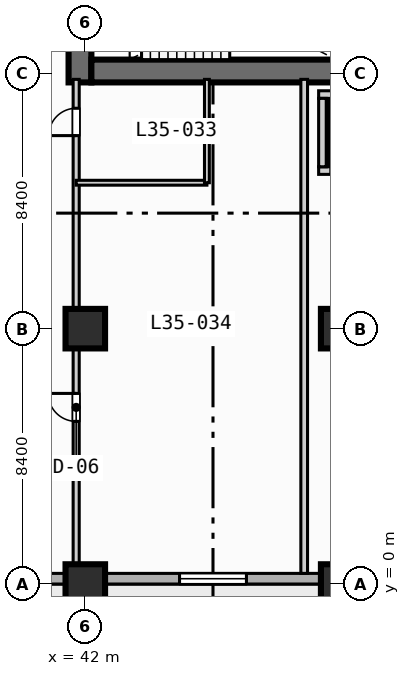
"""IFC4 building model, lengths in metres.
Left out: names, types, materials, properties, quantities, classifications, styles, units other than length and angle.
Written with IfcOpenShell. Run it as: python <this file> out.ifc"""

import sys

from ifc_helpers import new_model, si_unit, direction, frame, frame_2d, origin, origin_2d, place, context, subcontext, project, spatial, rectangle, extrude, element, fill, save


model = new_model("IFC4")
c1 = context("Model", 3, precision=1e-05, world=origin(), true_north=direction((0.0, 1.0)))
c2 = subcontext(c1, "Body", "Model", "MODEL_VIEW")
j1 = project(units=[si_unit("LENGTHUNIT", "METRE"), si_unit("PLANEANGLEUNIT", "RADIAN")], contexts=[c1])
p1 = place(None, origin())
s1 = spatial("IfcSite", under=j1, at=p1, CompositionType="ELEMENT")
p2 = place(p1, origin())
s2 = spatial("IfcBuilding", under=s1, at=p2, CompositionType="ELEMENT")
p3 = place(p2, frame((0.0, 0.0, 145.6)))
s3 = spatial("IfcBuildingStorey", under=s2, at=p3, CompositionType="ELEMENT", Elevation=145.6)
p4 = place(p3, frame((41.825, 16.5, 0.0), z_axis=(0.0, 0.0, 1.0), x_axis=(0.0, 1.0, 0.0)))
e1 = element("IfcWall", 1, at=p4, inside=s3, PredefinedType="SHEAR", context=c2, shape_type="SweptSolid", body=[
    extrude(rectangle(XDim=1.5, YDim=0.75, at=frame_2d((0.75, 0.0))), origin(), (0.0, 0.0, 1.0), 3.55),
])
p5 = place(p3, frame((42.2, 16.875, 0.0), z_axis=(0.0, 0.0, 1.0), x_axis=(1.0, 0.0, 0.0)))
e2 = element("IfcWall", 2, at=p5, inside=s3, PredefinedType="SHEAR", context=c2, shape_type="SweptSolid", body=[
    extrude(rectangle(XDim=16.35, YDim=0.75, at=frame_2d((8.175, 0.0))), origin(), (0.0, 0.0, 1.0), 3.55),
])
for number, where, z_axis, x_axis in (
    (3, (42.0, 0.0, 0.0), (0.0, 0.0, 1.0), (1.0, 0.0, 0.0)),
    (4, (42.0, 8.4, 0.0), (0.0, 0.0, 1.0), (1.0, 0.0, 0.0)),
    (5, (50.4, 0.0, 0.0), (0.0, 0.0, 1.0), (1.0, 0.0, 0.0)),
    (6, (50.4, 8.4, 0.0), (0.0, 0.0, 1.0), (1.0, 0.0, 0.0)),
):
    element("IfcColumn", number, at=place(p3, frame(where, z_axis=z_axis, x_axis=x_axis)), inside=s3, PredefinedType="COLUMN", context=c2, shape_type="SweptSolid", body=[
        extrude(rectangle(XDim=1.3, YDim=1.3, at=origin_2d()), origin(), (0.0, 0.0, 1.0), 3.8),
    ])
p6 = place(p3, frame((72.425, 0.175, 0.0), z_axis=(0.0, 0.0, 1.0), x_axis=(-1.0, 0.0, 0.0)))
e7 = element("IfcWall", 7, at=p6, inside=s3, PredefinedType="STANDARD", context=c2, shape_type="SweptSolid", body=[
    extrude(rectangle(XDim=69.25, YDim=0.35, at=frame_2d((34.625, 0.0))), origin(), (0.0, 0.0, 1.0), 3.55),
])
p7 = place(p6, frame((50.725, 0.0, 0.0)))
e8 = element("IfcOpeningElement", 8, at=p7, cuts=e7, PredefinedType="OPENING", context=c2, shape_type="SweptSolid", body=[
    extrude(rectangle(XDim=1.4, YDim=2.2, at=frame_2d((0.7, 1.1))), frame((0.0, 0.185, 0.0), z_axis=(0.0, -1.0, 0.0), x_axis=(1.0, 0.0, 0.0)), (0.0, 0.0, 1.0), 0.37),
])
p8 = place(p6, frame((58.725, 0.0, 0.85)))
e9 = element("IfcOpeningElement", 9, at=p8, cuts=e7, PredefinedType="OPENING", context=c2, shape_type="SweptSolid", body=[
    extrude(rectangle(XDim=2.2, YDim=1.8, at=frame_2d((1.1, 0.9))), frame((0.0, 0.185, 0.0), z_axis=(0.0, -1.0, 0.0), x_axis=(1.0, 0.0, 0.0)), (0.0, 0.0, 1.0), 0.37),
])
p9 = place(p6, frame((33.525, 0.0, 0.85)))
e10 = element("IfcOpeningElement", 10, at=p9, cuts=e7, PredefinedType="OPENING", context=c2, shape_type="SweptSolid", body=[
    extrude(rectangle(XDim=2.2, YDim=1.8, at=frame_2d((1.1, 0.9))), frame((0.0, 0.185, 0.0), z_axis=(0.0, -1.0, 0.0), x_axis=(1.0, 0.0, 0.0)), (0.0, 0.0, 1.0), 0.37),
])
p10 = place(p6, frame((25.125, 0.0, 0.85)))
e11 = element("IfcOpeningElement", 11, at=p10, cuts=e7, PredefinedType="OPENING", context=c2, shape_type="SweptSolid", body=[
    extrude(rectangle(XDim=2.2, YDim=1.8, at=frame_2d((1.1, 0.9))), frame((0.0, 0.185, 0.0), z_axis=(0.0, -1.0, 0.0), x_axis=(1.0, 0.0, 0.0)), (0.0, 0.0, 1.0), 0.37),
])
p11 = place(p6, frame((8.325, 0.0, 0.85)))
e12 = element("IfcOpeningElement", 12, at=p11, cuts=e7, PredefinedType="OPENING", context=c2, shape_type="SweptSolid", body=[
    extrude(rectangle(XDim=2.2, YDim=1.8, at=frame_2d((1.1, 0.9))), frame((0.0, 0.185, 0.0), z_axis=(0.0, -1.0, 0.0), x_axis=(1.0, 0.0, 0.0)), (0.0, 0.0, 1.0), 0.37),
])
p12 = place(p6, frame((2.125, 0.0, 0.85)))
e13 = element("IfcOpeningElement", 13, at=p12, cuts=e7, PredefinedType="OPENING", context=c2, shape_type="SweptSolid", body=[
    extrude(rectangle(XDim=1.8, YDim=1.8, at=frame_2d((0.9, 0.9))), frame((0.0, 0.185, 0.0), z_axis=(0.0, -1.0, 0.0), x_axis=(1.0, 0.0, 0.0)), (0.0, 0.0, 1.0), 0.37),
])
p13 = place(p3, frame((49.675, 13.6, 0.0), z_axis=(0.0, 0.0, 1.0), x_axis=(1.0, 0.0, 0.0)))
e14 = element("IfcWall", 14, at=p13, inside=s3, PredefinedType="SOLIDWALL", context=c2, shape_type="SweptSolid", body=[
    extrude(rectangle(XDim=2.25, YDim=0.25, at=frame_2d((1.125, 0.0))), origin(), (0.0, 0.0, 1.0), 3.55),
])
p14 = place(p13, frame((0.4, 0.0, 0.0)))
e15 = element("IfcOpeningElement", 15, at=p14, cuts=e14, PredefinedType="OPENING", context=c2, shape_type="SweptSolid", body=[
    extrude(rectangle(XDim=1.1, YDim=2.15, at=frame_2d((0.55, 1.075))), frame((0.0, 0.135, 0.0), z_axis=(0.0, -1.0, 0.0), x_axis=(1.0, 0.0, 0.0)), (0.0, 0.0, 1.0), 0.27),
])
for number, where, z_axis, x_axis in (
    (16, (49.675, 16.1, 0.0), (0.0, 0.0, 1.0), (1.0, 0.0, 0.0)),
    (17, (49.8, 13.725, 0.0), (0.0, 0.0, 1.0), (0.0, 1.0, 0.0)),
):
    element("IfcWall", number, at=place(p3, frame(where, z_axis=z_axis, x_axis=x_axis)), inside=s3, PredefinedType="SOLIDWALL", context=c2, shape_type="SweptSolid", body=[
        extrude(rectangle(XDim=2.25, YDim=0.25, at=frame_2d((1.125, 0.0))), origin(), (0.0, 0.0, 1.0), 3.55),
    ])
p15 = place(p3, frame((41.7, 0.35, 0.0), z_axis=(0.0, 0.0, 1.0), x_axis=(0.0, 1.0, 0.0)))
e18 = element("IfcWall", 18, at=p15, inside=s3, PredefinedType="PARTITIONING", context=c2, shape_type="SweptSolid", body=[
    extrude(rectangle(XDim=16.25, YDim=0.2, at=frame_2d((8.125, 0.0))), origin(), (0.0, 0.0, 1.0), 2.8),
])
p16 = place(p15, frame((5.0, 0.0, 0.0)))
e19 = element("IfcOpeningElement", 19, at=p16, cuts=e18, PredefinedType="OPENING", context=c2, shape_type="SweptSolid", body=[
    extrude(rectangle(XDim=0.92, YDim=2.1, at=frame_2d((0.46, 1.05))), frame((0.0, 0.11, 0.0), z_axis=(0.0, -1.0, 0.0), x_axis=(1.0, 0.0, 0.0)), (0.0, 0.0, 1.0), 0.22),
])
p17 = place(p15, frame((14.4, 0.0, 0.0)))
e20 = element("IfcOpeningElement", 20, at=p17, cuts=e18, PredefinedType="OPENING", context=c2, shape_type="SweptSolid", body=[
    extrude(rectangle(XDim=0.9, YDim=2.1, at=frame_2d((0.45, 1.05))), frame((0.0, 0.11, 0.0), z_axis=(0.0, -1.0, 0.0), x_axis=(1.0, 0.0, 0.0)), (0.0, 0.0, 1.0), 0.22),
])
p18 = place(p3, frame((49.2, 0.35, 0.0), z_axis=(0.0, 0.0, 1.0), x_axis=(0.0, 1.0, 0.0)))
e21 = element("IfcWall", 21, at=p18, inside=s3, PredefinedType="PARTITIONING", context=c2, shape_type="SweptSolid", body=[
    extrude(rectangle(XDim=16.25, YDim=0.22, at=frame_2d((8.125, 0.0))), origin(), (0.0, 0.0, 1.0), 3.55),
])
p19 = place(p3, frame((41.7, 13.2, 0.0), z_axis=(0.0, 0.0, 1.0), x_axis=(1.0, 0.0, 0.0)))
e22 = element("IfcWall", 22, at=p19, inside=s3, PredefinedType="PARTITIONING", context=c2, shape_type="SweptSolid", body=[
    extrude(rectangle(XDim=4.3, YDim=0.16, at=frame_2d((2.15, 0.0))), origin(), (0.0, 0.0, 1.0), 3.55),
])
p20 = place(p3, frame((46.0, 13.2, 0.0), z_axis=(0.0, 0.0, 1.0), x_axis=(0.0, 1.0, 0.0)))
e23 = element("IfcWall", 23, at=p20, inside=s3, PredefinedType="PARTITIONING", context=c2, shape_type="SweptSolid", body=[
    extrude(rectangle(XDim=3.4, YDim=0.16, at=frame_2d((1.7, 0.0))), origin(), (0.0, 0.0, 1.0), 3.55),
])
p21 = place(p10, origin())
e24 = element("IfcWindow", 24, at=p21, inside=s3, PartitioningType="SINGLE_PANEL", PredefinedType="WINDOW", context=c2, shape_type="SweptSolid", body=[
    extrude(rectangle(XDim=2.2, YDim=1.8, at=frame_2d((1.1, 0.9))), frame((0.0, 0.03, 0.0), z_axis=(0.0, -1.0, 0.0), x_axis=(1.0, 0.0, 0.0)), (0.0, 0.0, 1.0), 0.06),
])
fill(e11, e24)
p22 = place(p16, origin())
e25 = element("IfcDoor", 25, at=p22, inside=s3, OperationType="SINGLE_SWING_RIGHT", PredefinedType="DOOR", context=c2, shape_type="SweptSolid", body=[
    extrude(rectangle(XDim=0.92, YDim=2.1, at=frame_2d((0.46, 1.05))), frame((0.0, 0.025, 0.0), z_axis=(0.0, -1.0, 0.0), x_axis=(1.0, 0.0, 0.0)), (0.0, 0.0, 1.0), 0.05),
])
fill(e19, e25)
p23 = place(p17, origin())
e26 = element("IfcDoor", 26, at=p23, inside=s3, OperationType="SINGLE_SWING_LEFT", PredefinedType="DOOR", context=c2, shape_type="SweptSolid", body=[
    extrude(rectangle(XDim=0.9, YDim=2.1, at=frame_2d((0.45, 1.05))), frame((0.0, 0.025, 0.0), z_axis=(0.0, -1.0, 0.0), x_axis=(1.0, 0.0, 0.0)), (0.0, 0.0, 1.0), 0.05),
])
fill(e20, e26)
save(model, sys.argv[1])
